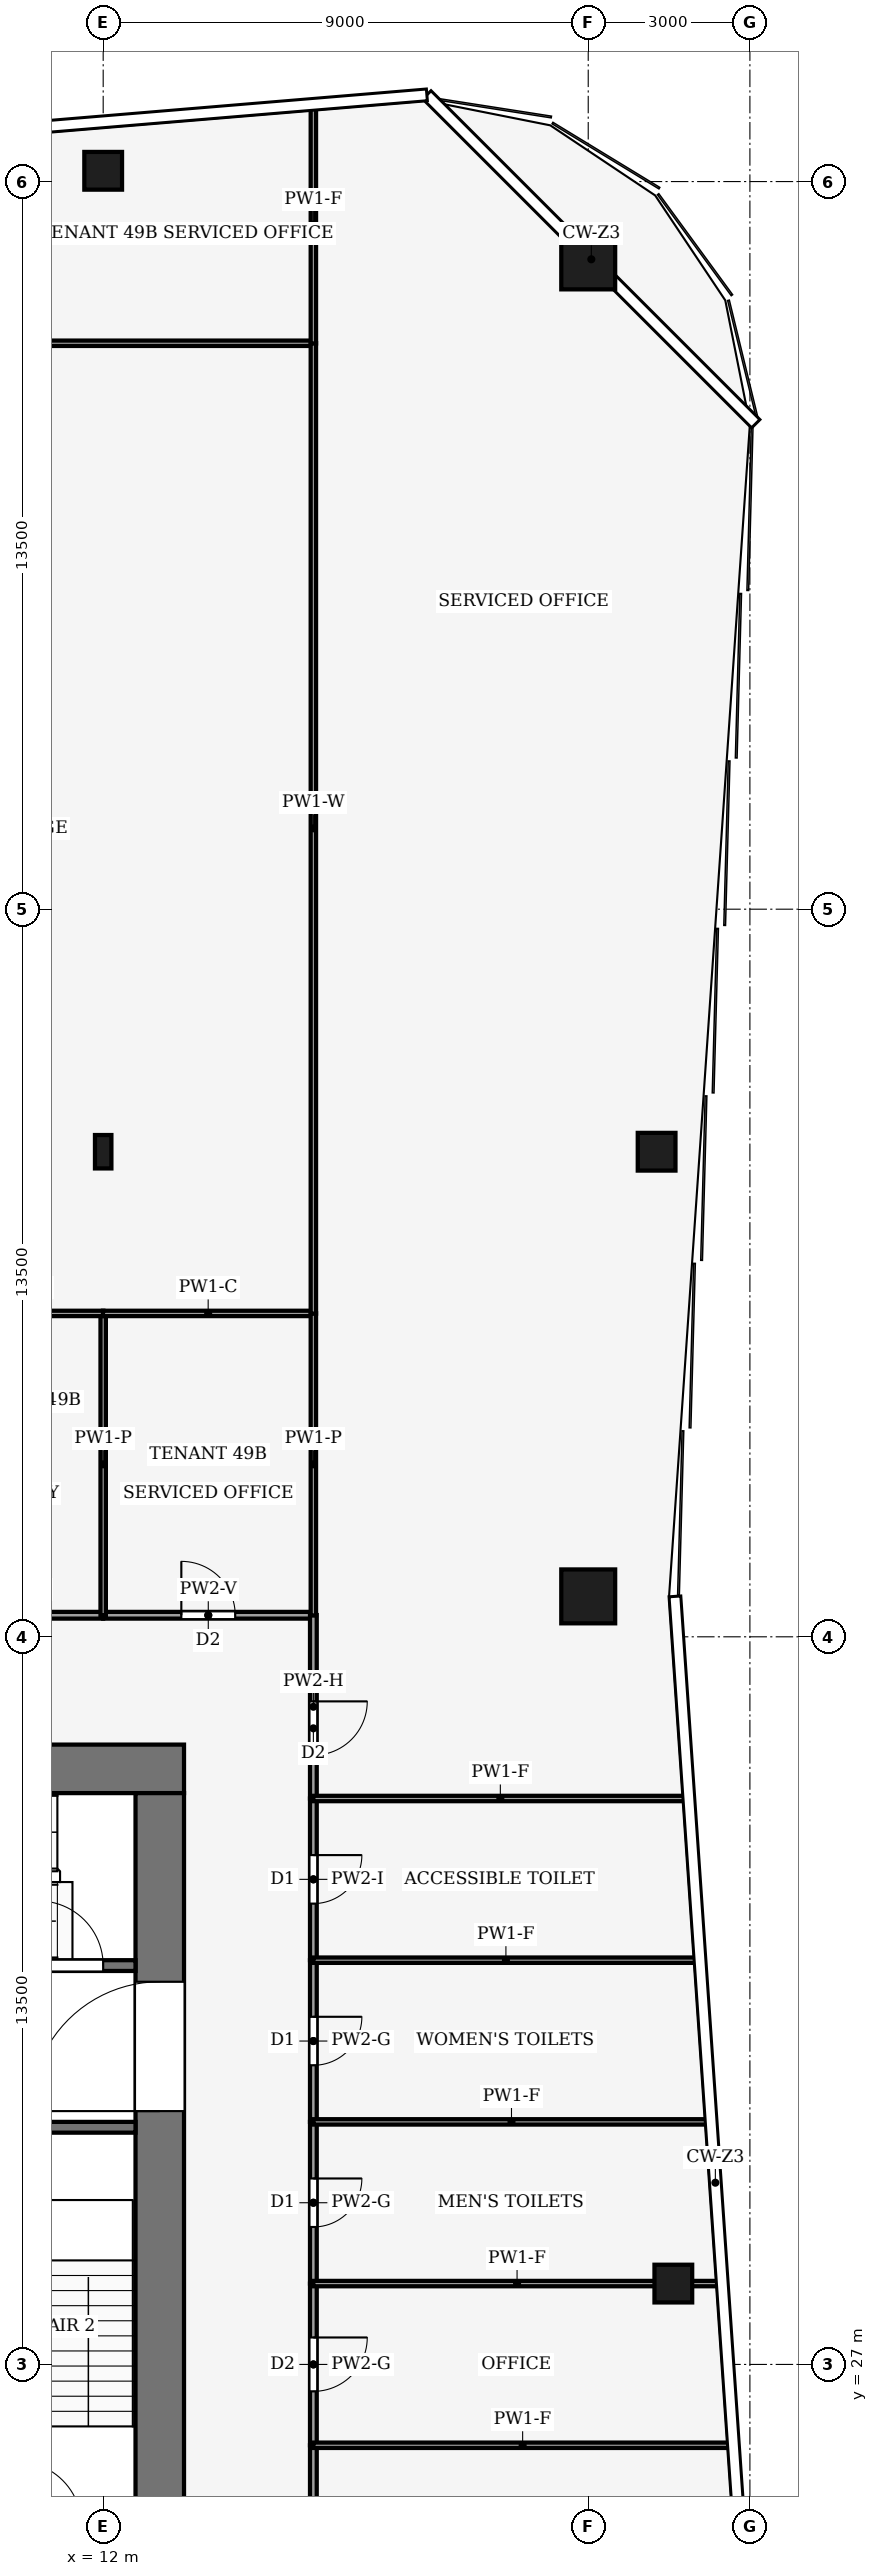
"""IFC4 building model, lengths in metres.
Left out: names, types, materials, properties, quantities, classifications, styles, units other than length and angle.
Written with IfcOpenShell. Run it as: python <this file> out.ifc"""

import sys

from ifc_helpers import new_model, si_unit, direction, frame, frame_2d, origin, origin_2d, place, context, subcontext, project, spatial, rectangle, hollow_rectangle, i_section, extrude, element, fill, save


model = new_model("IFC4")
c1 = context("Model", 3, precision=1e-05, world=origin(), true_north=direction((0.0, 1.0)))
c2 = subcontext(c1, "Body", "Model", "MODEL_VIEW")
j1 = project(units=[si_unit("LENGTHUNIT", "METRE"), si_unit("PLANEANGLEUNIT", "RADIAN")], contexts=[c1])
p1 = place(None, origin())
s1 = spatial("IfcSite", under=j1, at=p1, CompositionType="ELEMENT")
p2 = place(p1, origin())
s2 = spatial("IfcBuilding", under=s1, at=p2, CompositionType="ELEMENT")
p3 = place(p2, frame((0.0, 0.0, 214.0)))
s3 = spatial("IfcBuildingStorey", under=s2, at=p3, CompositionType="ELEMENT", Elevation=214.0)
p4 = place(p3, frame((-13.5, 38.05, -0.13), z_axis=(0.0, 0.0, 1.0), x_axis=(1.0, 0.0, 0.0)))
e1 = element("IfcWall", 1, at=p4, inside=s3, PredefinedType="SHEAR", context=c2, shape_type="SweptSolid", body=[
    extrude(rectangle(XDim=27.0, YDim=0.9, at=frame_2d((13.5, 0.0))), origin(), (0.0, 0.0, 1.0), 4.0),
])
p5 = place(p3, frame((13.05, 18.4, -0.13), z_axis=(0.0, 0.0, 1.0), x_axis=(0.0, 1.0, 0.0)))
e2 = element("IfcWall", 2, at=p5, inside=s3, PredefinedType="SHEAR", context=c2, shape_type="SweptSolid", body=[
    extrude(rectangle(XDim=19.2, YDim=0.9, at=frame_2d((9.6, 0.0))), origin(), (0.0, 0.0, 1.0), 4.0),
])
p6 = place(p5, frame((2.8, 0.0, 0.13)))
e3 = element("IfcOpeningElement", 3, at=p6, cuts=e2, PredefinedType="OPENING", context=c2, shape_type="SweptSolid", body=[
    extrude(rectangle(XDim=2.4, YDim=2.4, at=frame_2d((1.2, 1.2))), frame((0.0, 0.46, 0.0), z_axis=(0.0, -1.0, 0.0), x_axis=(1.0, 0.0, 0.0)), (0.0, 0.0, 1.0), 0.92),
])
p7 = place(p5, frame((13.3, 0.0, 0.13)))
e4 = element("IfcOpeningElement", 4, at=p7, cuts=e2, PredefinedType="OPENING", context=c2, shape_type="SweptSolid", body=[
    extrude(rectangle(XDim=2.4, YDim=2.4, at=frame_2d((1.2, 1.2))), frame((0.0, 0.46, 0.0), z_axis=(0.0, -1.0, 0.0), x_axis=(1.0, 0.0, 0.0)), (0.0, 0.0, 1.0), 0.92),
])
for number, where, z_axis, x_axis in (
    (5, (21.0, 66.0, 0.0), (0.0, 0.0, 1.0), (1.0, 0.0, 0.0)),
    (6, (21.0, 41.25, 0.0), (0.0, 0.0, 1.0), (1.0, 0.0, 0.0)),
):
    element("IfcColumn", number, at=place(p3, frame(where, z_axis=z_axis, x_axis=x_axis)), inside=s3, PredefinedType="COLUMN", context=c2, shape_type="SweptSolid", body=[
        extrude(hollow_rectangle(XDim=1.0, YDim=1.0, WallThickness=0.06, at=origin_2d()), origin(), (0.0, 0.0, 1.0), 4.0),
    ])
for number, where, z_axis, x_axis in (
    (7, (12.0, 67.7, 0.0), (0.0, 0.0, 1.0), (1.0, 0.0, 0.0)),
    (8, (22.579, 28.5, 0.0), (0.0, 0.0, 1.0), (1.0, 0.0, 0.0)),
    (9, (22.269, 49.5, 0.0), (0.0, 0.0, 1.0), (1.0, 0.0, 0.0)),
):
    element("IfcColumn", number, at=place(p3, frame(where, z_axis=z_axis, x_axis=x_axis)), inside=s3, PredefinedType="COLUMN", context=c2, shape_type="SweptSolid", body=[
        extrude(hollow_rectangle(XDim=0.7, YDim=0.7, WallThickness=0.03, at=origin_2d()), origin(), (0.0, 0.0, 1.0), 4.0),
    ])
p8 = place(p3, frame((12.0, 49.5, 0.0), z_axis=(0.0, 0.0, 1.0), x_axis=(1.0, 0.0, 0.0)))
e10 = element("IfcColumn", 10, at=p8, inside=s3, PredefinedType="COLUMN", context=c2, shape_type="SweptSolid", body=[
    extrude(i_section(OverallWidth=0.305, OverallDepth=0.62, WebThickness=0.021, FlangeThickness=0.04, FilletRadius=0.027, at=origin_2d()), origin(), (0.0, 0.0, 1.0), 4.0),
])
p9 = place(p3, frame((6.0, 31.4, 0.0), z_axis=(0.0, 0.0, 1.0), x_axis=(1.0, 0.0, 0.0)))
e11 = element("IfcWall", 11, at=p9, inside=s3, PredefinedType="PARTITIONING", context=c2, shape_type="SweptSolid", body=[
    extrude(rectangle(XDim=6.6, YDim=0.2, at=frame_2d((3.3, 0.0))), origin(), (0.0, 0.0, 1.0), 3.87),
])
p10 = place(p3, frame((6.0, 34.4, 0.0), z_axis=(0.0, 0.0, 1.0), x_axis=(1.0, 0.0, 0.0)))
e12 = element("IfcWall", 12, at=p10, inside=s3, PredefinedType="PARTITIONING", context=c2, shape_type="SweptSolid", body=[
    extrude(rectangle(XDim=6.6, YDim=0.2, at=frame_2d((3.3, 0.0))), origin(), (0.0, 0.0, 1.0), 3.87),
])
p11 = place(p10, frame((4.8, 0.0, 0.0)))
e13 = element("IfcOpeningElement", 13, at=p11, cuts=e12, PredefinedType="OPENING", context=c2, shape_type="SweptSolid", body=[
    extrude(rectangle(XDim=1.2, YDim=2.2, at=frame_2d((0.6, 1.1))), frame((0.0, 0.11, 0.0), z_axis=(0.0, -1.0, 0.0), x_axis=(1.0, 0.0, 0.0)), (0.0, 0.0, 1.0), 0.22),
])
p12 = place(p3, frame((12.0, 40.9, 0.0), z_axis=(0.0, 0.0, 1.0), x_axis=(-1.0, 0.0, 0.0)))
e14 = element("IfcWall", 14, at=p12, inside=s3, PredefinedType="PARTITIONING", context=c2, shape_type="SweptSolid", body=[
    extrude(rectangle(XDim=3.0, YDim=0.125, at=frame_2d((1.5, 0.0))), origin(), (0.0, 0.0, 1.0), 3.44),
])
p13 = place(p3, frame((12.0, 40.9, 0.0), z_axis=(0.0, 0.0, 1.0), x_axis=(1.0, 0.0, 0.0)))
e15 = element("IfcWall", 15, at=p13, inside=s3, PredefinedType="PARTITIONING", context=c2, shape_type="SweptSolid", body=[
    extrude(rectangle(XDim=3.9, YDim=0.125, at=frame_2d((1.95, 0.0))), origin(), (0.0, 0.0, 1.0), 3.44),
])
p14 = place(p13, frame((1.45, 0.0, 0.0)))
e16 = element("IfcOpeningElement", 16, at=p14, cuts=e15, PredefinedType="OPENING", context=c2, shape_type="SweptSolid", body=[
    extrude(rectangle(XDim=1.0, YDim=2.1, at=frame_2d((0.5, 1.05))), frame((0.0, 0.073, 0.0), z_axis=(0.0, -1.0, 0.0), x_axis=(1.0, 0.0, 0.0)), (0.0, 0.0, 1.0), 0.145),
])
p15 = place(p3, frame((15.9, 25.5, 0.0), z_axis=(0.0, 0.0, 1.0), x_axis=(0.0, -1.0, 0.0)))
e17 = element("IfcWall", 17, at=p15, inside=s3, PredefinedType="PARTITIONING", context=c2, shape_type="SweptSolid", body=[
    extrude(rectangle(XDim=11.905, YDim=0.125, at=frame_2d((5.953, 0.0))), origin(), (0.0, 0.0, 1.0), 3.04),
])
p16 = place(p15, frame((5.387, 0.0, 0.0)))
e18 = element("IfcOpeningElement", 18, at=p16, cuts=e17, PredefinedType="OPENING", context=c2, shape_type="SweptSolid", body=[
    extrude(rectangle(XDim=1.0, YDim=2.1, at=frame_2d((0.5, 1.05))), frame((0.0, 0.073, 0.0), z_axis=(0.0, -1.0, 0.0), x_axis=(1.0, 0.0, 0.0)), (0.0, 0.0, 1.0), 0.145),
])
p17 = place(p3, frame((15.9, 28.5, 0.0), z_axis=(0.0, 0.0, 1.0), x_axis=(0.0, -1.0, 0.0)))
e19 = element("IfcWall", 19, at=p17, inside=s3, PredefinedType="PARTITIONING", context=c2, shape_type="SweptSolid", body=[
    extrude(rectangle(XDim=3.0, YDim=0.125, at=frame_2d((1.5, 0.0))), origin(), (0.0, 0.0, 1.0), 3.87),
])
p18 = place(p17, frame((1.0, 0.0, 0.0)))
e20 = element("IfcOpeningElement", 20, at=p18, cuts=e19, PredefinedType="OPENING", context=c2, shape_type="SweptSolid", body=[
    extrude(rectangle(XDim=1.0, YDim=2.1, at=frame_2d((0.5, 1.05))), frame((0.0, 0.073, 0.0), z_axis=(0.0, -1.0, 0.0), x_axis=(1.0, 0.0, 0.0)), (0.0, 0.0, 1.0), 0.145),
])
p19 = place(p3, frame((15.9, 31.5, 0.0), z_axis=(0.0, 0.0, 1.0), x_axis=(0.0, -1.0, 0.0)))
e21 = element("IfcWall", 21, at=p19, inside=s3, PredefinedType="PARTITIONING", context=c2, shape_type="SweptSolid", body=[
    extrude(rectangle(XDim=3.0, YDim=0.125, at=frame_2d((1.5, 0.0))), origin(), (0.0, 0.0, 1.0), 3.87),
])
p20 = place(p19, frame((1.05, 0.0, 0.0)))
e22 = element("IfcOpeningElement", 22, at=p20, cuts=e21, PredefinedType="OPENING", context=c2, shape_type="SweptSolid", body=[
    extrude(rectangle(XDim=0.9, YDim=2.1, at=frame_2d((0.45, 1.05))), frame((0.0, 0.073, 0.0), z_axis=(0.0, -1.0, 0.0), x_axis=(1.0, 0.0, 0.0)), (0.0, 0.0, 1.0), 0.145),
])
p21 = place(p3, frame((15.9, 34.5, 0.0), z_axis=(0.0, 0.0, 1.0), x_axis=(0.0, -1.0, 0.0)))
e23 = element("IfcWall", 23, at=p21, inside=s3, PredefinedType="PARTITIONING", context=c2, shape_type="SweptSolid", body=[
    extrude(rectangle(XDim=3.0, YDim=0.125, at=frame_2d((1.5, 0.0))), origin(), (0.0, 0.0, 1.0), 3.87),
])
p22 = place(p21, frame((1.05, 0.0, 0.0)))
e24 = element("IfcOpeningElement", 24, at=p22, cuts=e23, PredefinedType="OPENING", context=c2, shape_type="SweptSolid", body=[
    extrude(rectangle(XDim=0.9, YDim=2.1, at=frame_2d((0.45, 1.05))), frame((0.0, 0.073, 0.0), z_axis=(0.0, -1.0, 0.0), x_axis=(1.0, 0.0, 0.0)), (0.0, 0.0, 1.0), 0.145),
])
p23 = place(p3, frame((15.9, 37.5, 0.0), z_axis=(0.0, 0.0, 1.0), x_axis=(0.0, -1.0, 0.0)))
e25 = element("IfcWall", 25, at=p23, inside=s3, PredefinedType="PARTITIONING", context=c2, shape_type="SweptSolid", body=[
    extrude(rectangle(XDim=3.0, YDim=0.125, at=frame_2d((1.5, 0.0))), origin(), (0.0, 0.0, 1.0), 3.48),
])
p24 = place(p23, frame((1.05, 0.0, 0.0)))
e26 = element("IfcOpeningElement", 26, at=p24, cuts=e25, PredefinedType="OPENING", context=c2, shape_type="SweptSolid", body=[
    extrude(rectangle(XDim=0.9, YDim=2.1, at=frame_2d((0.45, 1.05))), frame((0.0, 0.073, 0.0), z_axis=(0.0, -1.0, 0.0), x_axis=(1.0, 0.0, 0.0)), (0.0, 0.0, 1.0), 0.145),
])
p25 = place(p3, frame((15.9, 40.904, 0.0), z_axis=(0.0, 0.0, 1.0), x_axis=(0.0, -1.0, 0.0)))
e27 = element("IfcWall", 27, at=p25, inside=s3, PredefinedType="PARTITIONING", context=c2, shape_type="SweptSolid", body=[
    extrude(rectangle(XDim=3.404, YDim=0.125, at=frame_2d((1.702, 0.0))), origin(), (0.0, 0.0, 1.0), 3.14),
])
p26 = place(p25, frame((1.602, 0.0, 0.0)))
e28 = element("IfcOpeningElement", 28, at=p26, cuts=e27, PredefinedType="OPENING", context=c2, shape_type="SweptSolid", body=[
    extrude(rectangle(XDim=1.0, YDim=2.1, at=frame_2d((0.5, 1.05))), frame((0.0, 0.073, 0.0), z_axis=(0.0, -1.0, 0.0), x_axis=(1.0, 0.0, 0.0)), (0.0, 0.0, 1.0), 0.145),
])
p27 = place(p3, frame((12.0, 40.9, 0.0), z_axis=(0.0, 0.0, 1.0), x_axis=(0.0, 1.0, 0.0)))
e29 = element("IfcWall", 29, at=p27, inside=s3, PredefinedType="PARTITIONING", context=c2, shape_type="SweptSolid", body=[
    extrude(rectangle(XDim=5.6, YDim=0.1, at=frame_2d((2.8, 0.0))), origin(), (0.0, 0.0, 1.0), 3.44),
])
p28 = place(p3, frame((12.004, 46.5, 0.0), z_axis=(0.0, 0.0, 1.0), x_axis=(-1.0, 0.0, 0.0)))
e30 = element("IfcWall", 30, at=p28, inside=s3, PredefinedType="PARTITIONING", context=c2, shape_type="SweptSolid", body=[
    extrude(rectangle(XDim=3.008, YDim=0.1, at=frame_2d((1.504, 0.0))), origin(), (0.0, 0.0, 1.0), 3.87),
])
p29 = place(p3, frame((15.9, 46.5, 0.0), z_axis=(0.0, 0.0, 1.0), x_axis=(-1.0, 0.0, 0.0)))
e31 = element("IfcWall", 31, at=p29, inside=s3, PredefinedType="PARTITIONING", context=c2, shape_type="SweptSolid", body=[
    extrude(rectangle(XDim=3.904, YDim=0.1, at=frame_2d((1.952, 0.0))), origin(), (0.0, 0.0, 1.0), 3.87),
])
p30 = place(p3, frame((15.9, 40.896, 0.0), z_axis=(0.0, 0.0, 1.0), x_axis=(0.0, 1.0, 0.0)))
e32 = element("IfcWall", 32, at=p30, inside=s3, PredefinedType="PARTITIONING", context=c2, shape_type="SweptSolid", body=[
    extrude(rectangle(XDim=5.608, YDim=0.1, at=frame_2d((2.804, 0.0))), origin(), (0.0, 0.0, 1.0), 3.44),
])
p31 = place(p3, frame((3.0, 64.5, 0.0), z_axis=(0.0, 0.0, 1.0), x_axis=(1.0, 0.0, 0.0)))
e33 = element("IfcWall", 33, at=p31, inside=s3, PredefinedType="PARTITIONING", context=c2, shape_type="SweptSolid", body=[
    extrude(rectangle(XDim=12.9, YDim=0.1, at=frame_2d((6.45, 0.0))), origin(), (0.0, 0.0, 1.0), 3.24),
])
p32 = place(p31, frame((5.95, 0.0, 0.0)))
e34 = element("IfcOpeningElement", 34, at=p32, cuts=e33, PredefinedType="OPENING", context=c2, shape_type="SweptSolid", body=[
    extrude(rectangle(XDim=1.0, YDim=2.1, at=frame_2d((0.5, 1.05))), frame((0.0, 0.06, 0.0), z_axis=(0.0, -1.0, 0.0), x_axis=(1.0, 0.0, 0.0)), (0.0, 0.0, 1.0), 0.12),
])
p33 = place(p3, frame((15.9, 46.496, 0.0), z_axis=(0.0, 0.0, 1.0), x_axis=(0.0, 1.0, 0.0)))
e35 = element("IfcWall", 35, at=p33, inside=s3, PredefinedType="PARTITIONING", context=c2, shape_type="SweptSolid", body=[
    extrude(rectangle(XDim=18.008, YDim=0.1, at=frame_2d((9.004, 0.0))), origin(), (0.0, 0.0, 1.0), 3.24),
])
p34 = place(p3, frame((15.9, 64.496, 0.0), z_axis=(0.0, 0.0, 1.0), x_axis=(0.0, 1.0, 0.0)))
e36 = element("IfcWall", 36, at=p34, inside=s3, PredefinedType="PARTITIONING", context=c2, shape_type="SweptSolid", body=[
    extrude(rectangle(XDim=4.409, YDim=0.1, at=frame_2d((2.205, 0.0))), origin(), (0.0, 0.0, 1.0), 3.04),
])
p35 = place(p3, frame((23.666, 25.5, 0.0), z_axis=(0.0, 0.0, 1.0), x_axis=(-1.0, 0.0, 0.0)))
e37 = element("IfcWall", 37, at=p35, inside=s3, PredefinedType="PARTITIONING", context=c2, shape_type="SweptSolid", body=[
    extrude(rectangle(XDim=7.766, YDim=0.1, at=frame_2d((3.883, 0.0))), origin(), (0.0, 0.0, 1.0), 3.04),
])
p36 = place(p3, frame((23.459, 28.5, 0.0), z_axis=(0.0, 0.0, 1.0), x_axis=(-1.0, 0.0, 0.0)))
e38 = element("IfcWall", 38, at=p36, inside=s3, PredefinedType="PARTITIONING", context=c2, shape_type="SweptSolid", body=[
    extrude(rectangle(XDim=7.559, YDim=0.1, at=frame_2d((3.78, 0.0))), origin(), (0.0, 0.0, 1.0), 3.04),
])
p37 = place(p3, frame((23.252, 31.5, 0.0), z_axis=(0.0, 0.0, 1.0), x_axis=(-1.0, 0.0, 0.0)))
e39 = element("IfcWall", 39, at=p37, inside=s3, PredefinedType="PARTITIONING", context=c2, shape_type="SweptSolid", body=[
    extrude(rectangle(XDim=7.353, YDim=0.1, at=frame_2d((3.676, 0.0))), origin(), (0.0, 0.0, 1.0), 3.04),
])
p38 = place(p3, frame((23.045, 34.5, 0.0), z_axis=(0.0, 0.0, 1.0), x_axis=(-1.0, 0.0, 0.0)))
e40 = element("IfcWall", 40, at=p38, inside=s3, PredefinedType="PARTITIONING", context=c2, shape_type="SweptSolid", body=[
    extrude(rectangle(XDim=7.146, YDim=0.1, at=frame_2d((3.573, 0.0))), origin(), (0.0, 0.0, 1.0), 3.04),
])
p39 = place(p3, frame((22.839, 37.5, 0.0), z_axis=(0.0, 0.0, 1.0), x_axis=(-1.0, 0.0, 0.0)))
e41 = element("IfcWall", 41, at=p39, inside=s3, PredefinedType="PARTITIONING", context=c2, shape_type="SweptSolid", body=[
    extrude(rectangle(XDim=6.939, YDim=0.1, at=frame_2d((3.469, 0.0))), origin(), (0.0, 0.0, 1.0), 3.04),
])
p40 = place(p11, origin())
e42 = element("IfcDoor", 42, at=p40, inside=s3, OperationType="SINGLE_SWING_LEFT", PredefinedType="DOOR", context=c2, shape_type="SweptSolid", body=[
    extrude(rectangle(XDim=1.2, YDim=2.2, at=frame_2d((0.6, 1.1))), frame((0.0, 0.025, 0.0), z_axis=(0.0, -1.0, 0.0), x_axis=(1.0, 0.0, 0.0)), (0.0, 0.0, 1.0), 0.05),
])
fill(e13, e42)
p41 = place(p7, origin())
e43 = element("IfcDoor", 43, at=p41, inside=s3, OperationType="DOUBLE_DOOR_SINGLE_SWING", PredefinedType="DOOR", context=c2, shape_type="SweptSolid", body=[
    extrude(rectangle(XDim=2.4, YDim=2.4, at=frame_2d((1.2, 1.2))), frame((0.0, 0.025, 0.0), z_axis=(0.0, -1.0, 0.0), x_axis=(1.0, 0.0, 0.0)), (0.0, 0.0, 1.0), 0.05),
])
fill(e4, e43)
p42 = place(p14, origin())
e44 = element("IfcDoor", 44, at=p42, inside=s3, OperationType="SINGLE_SWING_RIGHT", PredefinedType="DOOR", context=c2, shape_type="SweptSolid", body=[
    extrude(rectangle(XDim=1.0, YDim=2.1, at=frame_2d((0.5, 1.05))), frame((0.0, 0.025, 0.0), z_axis=(0.0, -1.0, 0.0), x_axis=(1.0, 0.0, 0.0)), (0.0, 0.0, 1.0), 0.05),
])
fill(e16, e44)
p43 = place(p18, origin())
e45 = element("IfcDoor", 45, at=p43, inside=s3, OperationType="SINGLE_SWING_LEFT", PredefinedType="DOOR", context=c2, shape_type="SweptSolid", body=[
    extrude(rectangle(XDim=1.0, YDim=2.1, at=frame_2d((0.5, 1.05))), frame((0.0, 0.025, 0.0), z_axis=(0.0, -1.0, 0.0), x_axis=(1.0, 0.0, 0.0)), (0.0, 0.0, 1.0), 0.05),
])
fill(e20, e45)
p44 = place(p20, origin())
e46 = element("IfcDoor", 46, at=p44, inside=s3, OperationType="SINGLE_SWING_RIGHT", PredefinedType="DOOR", context=c2, shape_type="SweptSolid", body=[
    extrude(rectangle(XDim=0.9, YDim=2.1, at=frame_2d((0.45, 1.05))), frame((0.0, 0.025, 0.0), z_axis=(0.0, -1.0, 0.0), x_axis=(1.0, 0.0, 0.0)), (0.0, 0.0, 1.0), 0.05),
])
fill(e22, e46)
p45 = place(p22, origin())
e47 = element("IfcDoor", 47, at=p45, inside=s3, OperationType="SINGLE_SWING_LEFT", PredefinedType="DOOR", context=c2, shape_type="SweptSolid", body=[
    extrude(rectangle(XDim=0.9, YDim=2.1, at=frame_2d((0.45, 1.05))), frame((0.0, 0.025, 0.0), z_axis=(0.0, -1.0, 0.0), x_axis=(1.0, 0.0, 0.0)), (0.0, 0.0, 1.0), 0.05),
])
fill(e24, e47)
p46 = place(p24, origin())
e48 = element("IfcDoor", 48, at=p46, inside=s3, OperationType="SINGLE_SWING_RIGHT", PredefinedType="DOOR", context=c2, shape_type="SweptSolid", body=[
    extrude(rectangle(XDim=0.9, YDim=2.1, at=frame_2d((0.45, 1.05))), frame((0.0, 0.025, 0.0), z_axis=(0.0, -1.0, 0.0), x_axis=(1.0, 0.0, 0.0)), (0.0, 0.0, 1.0), 0.05),
])
fill(e26, e48)
p47 = place(p26, origin())
e49 = element("IfcDoor", 49, at=p47, inside=s3, OperationType="SINGLE_SWING_RIGHT", PredefinedType="DOOR", context=c2, shape_type="SweptSolid", body=[
    extrude(rectangle(XDim=1.0, YDim=2.1, at=frame_2d((0.5, 1.05))), frame((0.0, 0.025, 0.0), z_axis=(0.0, -1.0, 0.0), x_axis=(1.0, 0.0, 0.0)), (0.0, 0.0, 1.0), 0.05),
])
fill(e28, e49)
save(model, sys.argv[1])
